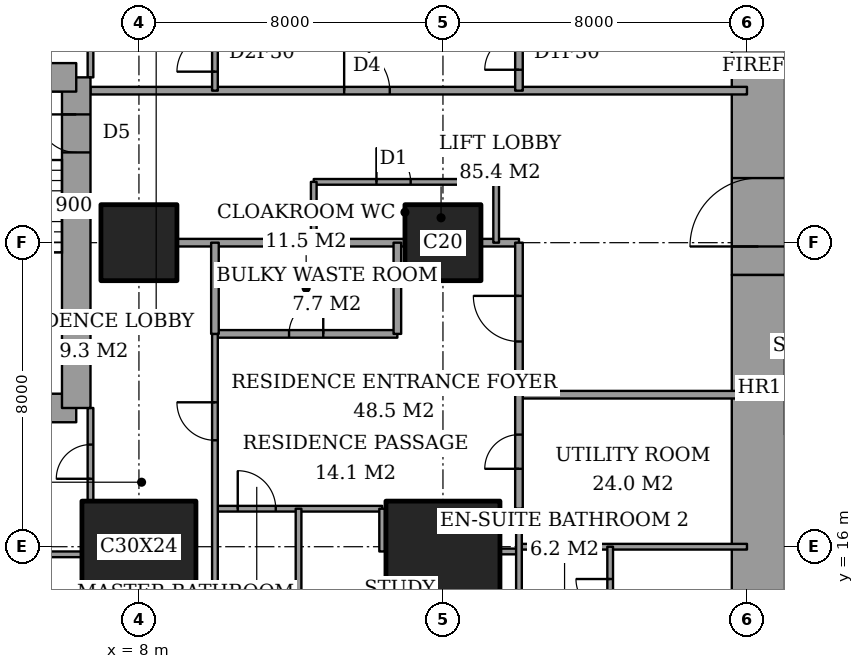
"""IFC4 building model, lengths in metres.
Left out: names, types, materials, properties, quantities, classifications, styles, units other than length and angle.
Written with IfcOpenShell. Run it as: python <this file> out.ifc"""

import sys

from ifc_helpers import new_model, si_unit, direction, frame, frame_2d, origin, origin_2d, place, context, subcontext, project, spatial, rectangle, extrude, element, fill, save


model = new_model("IFC4")
c1 = context("Model", 3, precision=1e-05, world=origin(), true_north=direction((0.0, 1.0)))
c2 = subcontext(c1, "Body", "Model", "MODEL_VIEW")
j1 = project(units=[si_unit("LENGTHUNIT", "METRE"), si_unit("PLANEANGLEUNIT", "RADIAN")], contexts=[c1])
p1 = place(None, origin())
s1 = spatial("IfcSite", under=j1, at=p1, CompositionType="ELEMENT")
p2 = place(p1, origin())
s2 = spatial("IfcBuilding", under=s1, at=p2, CompositionType="ELEMENT")
p3 = place(p2, frame((0.0, 0.0, 157.4)))
s3 = spatial("IfcBuildingStorey", under=s2, at=p3, CompositionType="ELEMENT", Elevation=157.4)
p4 = place(p3, frame((8.0, 16.0, 0.0), z_axis=(0.0, 0.0, 1.0), x_axis=(1.0, 0.0, 0.0)))
e1 = element("IfcColumn", 1, at=p4, inside=s3, PredefinedType="COLUMN", context=c2, shape_type="SweptSolid", body=[
    extrude(rectangle(XDim=3.0, YDim=2.4, at=origin_2d()), origin(), (0.0, 0.0, 1.0), 3.6),
])
p5 = place(p3, frame((8.0, 24.0, 0.0), z_axis=(0.0, 0.0, 1.0), x_axis=(1.0, 0.0, 0.0)))
e2 = element("IfcColumn", 2, at=p5, inside=s3, PredefinedType="COLUMN", context=c2, shape_type="SweptSolid", body=[
    extrude(rectangle(XDim=2.0, YDim=2.0, at=origin_2d()), origin(), (0.0, 0.0, 1.0), 3.6),
])
p6 = place(p3, frame((16.0, 16.0, 0.0), z_axis=(0.0, 0.0, 1.0), x_axis=(1.0, 0.0, 0.0)))
e3 = element("IfcColumn", 3, at=p6, inside=s3, PredefinedType="COLUMN", context=c2, shape_type="SweptSolid", body=[
    extrude(rectangle(XDim=3.0, YDim=2.4, at=origin_2d()), origin(), (0.0, 0.0, 1.0), 3.6),
])
p7 = place(p3, frame((16.0, 24.0, 0.0), z_axis=(0.0, 0.0, 1.0), x_axis=(1.0, 0.0, 0.0)))
e4 = element("IfcColumn", 4, at=p7, inside=s3, PredefinedType="COLUMN", context=c2, shape_type="SweptSolid", body=[
    extrude(rectangle(XDim=2.0, YDim=2.0, at=origin_2d()), origin(), (0.0, 0.0, 1.0), 3.6),
])
p8 = place(p3, frame((24.3, 13.0, 0.0), z_axis=(0.0, 0.0, 1.0), x_axis=(0.0, 1.0, 0.0)))
e5 = element("IfcWall", 5, at=p8, inside=s3, PredefinedType="SHEAR", context=c2, shape_type="SweptSolid", body=[
    extrude(rectangle(XDim=10.15, YDim=1.4, at=frame_2d((5.075, 0.0))), origin(), (0.0, 0.0, 1.0), 3.6),
])
p9 = place(p3, frame((24.3, 23.15, 0.0), z_axis=(0.0, 0.0, 1.0), x_axis=(0.0, 1.0, 0.0)))
e6 = element("IfcWall", 6, at=p9, inside=s3, PredefinedType="SHEAR", context=c2, shape_type="SweptSolid", body=[
    extrude(rectangle(XDim=11.85, YDim=1.4, at=frame_2d((5.925, 0.0))), origin(), (0.0, 0.0, 1.0), 3.6),
])
p10 = place(p9, frame((0.75, 0.0, 0.0)))
e7 = element("IfcOpeningElement", 7, at=p10, cuts=e6, PredefinedType="OPENING", context=c2, shape_type="SweptSolid", body=[
    extrude(rectangle(XDim=1.8, YDim=2.4, at=frame_2d((0.9, 1.2))), frame((0.0, 0.71, 0.0), z_axis=(0.0, -1.0, 0.0), x_axis=(1.0, 0.0, 0.0)), (0.0, 0.0, 1.0), 1.42),
])
p11 = place(p3, frame((1.9, 19.65, 0.0), z_axis=(0.0, 0.0, 1.0), x_axis=(1.0, 0.0, 0.0)))
e8 = element("IfcWall", 8, at=p11, inside=s3, PredefinedType="SHEAR", context=c2, shape_type="SweptSolid", body=[
    extrude(rectangle(XDim=4.45, YDim=0.75, at=frame_2d((2.225, 0.0))), origin(), (0.0, 0.0, 1.0), 3.6),
])
p12 = place(p3, frame((6.35, 19.65, 0.0), z_axis=(0.0, 0.0, 1.0), x_axis=(0.0, 1.0, 0.0)))
e9 = element("IfcWall", 9, at=p12, inside=s3, PredefinedType="SHEAR", context=c2, shape_type="SweptSolid", body=[
    extrude(rectangle(XDim=8.7, YDim=0.75, at=frame_2d((4.35, 0.0))), origin(), (0.0, 0.0, 1.0), 3.6),
])
p13 = place(p12, frame((6.725, 0.0, 0.0)))
e10 = element("IfcOpeningElement", 10, at=p13, cuts=e9, PredefinedType="OPENING", context=c2, shape_type="SweptSolid", body=[
    extrude(rectangle(XDim=1.0, YDim=2.1, at=frame_2d((0.5, 1.05))), frame((0.0, 0.385, 0.0), z_axis=(0.0, -1.0, 0.0), x_axis=(1.0, 0.0, 0.0)), (0.0, 0.0, 1.0), 0.77),
])
p14 = place(p3, frame((6.35, 28.35, 0.0), z_axis=(0.0, 0.0, 1.0), x_axis=(-1.0, 0.0, 0.0)))
e11 = element("IfcWall", 11, at=p14, inside=s3, PredefinedType="SHEAR", context=c2, shape_type="SweptSolid", body=[
    extrude(rectangle(XDim=4.45, YDim=0.75, at=frame_2d((2.225, 0.0))), origin(), (0.0, 0.0, 1.0), 3.6),
])
p15 = place(p3, frame((1.35, 15.8, 0.0), z_axis=(0.0, 0.0, 1.0), x_axis=(1.0, 0.0, 0.0)))
e12 = element("IfcWall", 12, at=p15, inside=s3, PredefinedType="PARTITIONING", context=c2, shape_type="SweptSolid", body=[
    extrude(rectangle(XDim=5.15, YDim=0.15, at=frame_2d((2.575, 0.0))), origin(), (0.0, 0.0, 1.0), 3.35),
])
p16 = place(p3, frame((17.5, 15.875, 0.0), z_axis=(0.0, 0.0, 1.0), x_axis=(1.0, 0.0, 0.0)))
e13 = element("IfcWall", 13, at=p16, inside=s3, PredefinedType="PARTITIONING", context=c2, shape_type="SweptSolid", body=[
    extrude(rectangle(XDim=0.5, YDim=0.15, at=frame_2d((0.25, 0.0))), origin(), (0.0, 0.0, 1.0), 2.634),
])
p17 = place(p3, frame((18.0, 16.0, 0.0), z_axis=(0.0, 0.0, 1.0), x_axis=(1.0, 0.0, 0.0)))
e14 = element("IfcWall", 14, at=p17, inside=s3, PredefinedType="PARTITIONING", context=c2, shape_type="SweptSolid", body=[
    extrude(rectangle(XDim=6.0, YDim=0.15, at=frame_2d((3.0, 0.0))), origin(), (0.0, 0.0, 1.0), 2.634),
])
p18 = place(p3, frame((10.0, 17.0, 0.0), z_axis=(0.0, 0.0, 1.0), x_axis=(1.0, 0.0, 0.0)))
e15 = element("IfcWall", 15, at=p18, inside=s3, PredefinedType="PARTITIONING", context=c2, shape_type="SweptSolid", body=[
    extrude(rectangle(XDim=4.4, YDim=0.15, at=frame_2d((2.2, 0.0))), origin(), (0.0, 0.0, 1.0), 3.35),
])
p19 = place(p18, frame((0.6, 0.0, 0.0)))
e16 = element("IfcOpeningElement", 16, at=p19, cuts=e15, PredefinedType="OPENING", context=c2, shape_type="SweptSolid", body=[
    extrude(rectangle(XDim=1.0, YDim=2.1, at=frame_2d((0.5, 1.05))), frame((0.0, 0.085, 0.0), z_axis=(0.0, -1.0, 0.0), x_axis=(1.0, 0.0, 0.0)), (0.0, 0.0, 1.0), 0.17),
])
p20 = place(p3, frame((18.0, 20.0, 0.0), z_axis=(0.0, 0.0, 1.0), x_axis=(1.0, 0.0, 0.0)))
e17 = element("IfcWall", 17, at=p20, inside=s3, PredefinedType="PARTITIONING", context=c2, shape_type="SweptSolid", body=[
    extrude(rectangle(XDim=6.0, YDim=0.2, at=frame_2d((3.0, 0.0))), origin(), (0.0, 0.0, 1.0), 3.35),
])
p21 = place(p3, frame((10.0, 21.6, 0.0), z_axis=(0.0, 0.0, 1.0), x_axis=(1.0, 0.0, 0.0)))
e18 = element("IfcWall", 18, at=p21, inside=s3, PredefinedType="PARTITIONING", context=c2, shape_type="SweptSolid", body=[
    extrude(rectangle(XDim=4.8, YDim=0.2, at=frame_2d((2.4, 0.0))), origin(), (0.0, 0.0, 1.0), 3.35),
])
p22 = place(p21, frame((1.95, 0.0, 0.0)))
e19 = element("IfcOpeningElement", 19, at=p22, cuts=e18, PredefinedType="OPENING", context=c2, shape_type="SweptSolid", body=[
    extrude(rectangle(XDim=0.9, YDim=2.1, at=frame_2d((0.45, 1.05))), frame((0.0, 0.11, 0.0), z_axis=(0.0, -1.0, 0.0), x_axis=(1.0, 0.0, 0.0)), (0.0, 0.0, 1.0), 0.22),
])
p23 = place(p3, frame((9.0, 24.0, 0.0), z_axis=(0.0, 0.0, 1.0), x_axis=(1.0, 0.0, 0.0)))
e20 = element("IfcWall", 20, at=p23, inside=s3, PredefinedType="PARTITIONING", context=c2, shape_type="SweptSolid", body=[
    extrude(rectangle(XDim=6.0, YDim=0.2, at=frame_2d((3.0, 0.0))), origin(), (0.0, 0.0, 1.0), 3.35),
])
p24 = place(p3, frame((17.0, 24.0, 0.0), z_axis=(0.0, 0.0, 1.0), x_axis=(1.0, 0.0, 0.0)))
e21 = element("IfcWall", 21, at=p24, inside=s3, PredefinedType="PARTITIONING", context=c2, shape_type="SweptSolid", body=[
    extrude(rectangle(XDim=1.0, YDim=0.2, at=frame_2d((0.5, 0.0))), origin(), (0.0, 0.0, 1.0), 3.35),
])
p25 = place(p3, frame((12.6, 25.6, 0.0), z_axis=(0.0, 0.0, 1.0), x_axis=(1.0, 0.0, 0.0)))
e22 = element("IfcWall", 22, at=p25, inside=s3, PredefinedType="PARTITIONING", context=c2, shape_type="SweptSolid", body=[
    extrude(rectangle(XDim=4.8, YDim=0.15, at=frame_2d((2.4, 0.0))), origin(), (0.0, 0.0, 1.0), 3.35),
])
p26 = place(p25, frame((1.65, 0.0, 0.0)))
e23 = element("IfcOpeningElement", 23, at=p26, cuts=e22, PredefinedType="OPENING", context=c2, shape_type="SweptSolid", body=[
    extrude(rectangle(XDim=0.9, YDim=2.1, at=frame_2d((0.45, 1.05))), frame((0.0, 0.085, 0.0), z_axis=(0.0, -1.0, 0.0), x_axis=(1.0, 0.0, 0.0)), (0.0, 0.0, 1.0), 0.17),
])
p27 = place(p3, frame((6.725, 28.0, 0.0), z_axis=(0.0, 0.0, 1.0), x_axis=(1.0, 0.0, 0.0)))
e24 = element("IfcWall", 24, at=p27, inside=s3, PredefinedType="PARTITIONING", context=c2, shape_type="SweptSolid", body=[
    extrude(rectangle(XDim=17.275, YDim=0.2, at=frame_2d((8.637, 0.0))), origin(), (0.0, 0.0, 1.0), 3.35),
])
p28 = place(p27, frame((6.675, 0.0, 0.0)))
e25 = element("IfcOpeningElement", 25, at=p28, cuts=e24, PredefinedType="OPENING", context=c2, shape_type="SweptSolid", body=[
    extrude(rectangle(XDim=1.2, YDim=2.4, at=frame_2d((0.6, 1.2))), frame((0.0, 0.11, 0.0), z_axis=(0.0, -1.0, 0.0), x_axis=(1.0, 0.0, 0.0)), (0.0, 0.0, 1.0), 0.22),
])
p29 = place(p3, frame((6.725, 17.2, 0.0), z_axis=(0.0, 0.0, 1.0), x_axis=(0.0, 1.0, 0.0)))
e26 = element("IfcWall", 26, at=p29, inside=s3, PredefinedType="PARTITIONING", context=c2, shape_type="SweptSolid", body=[
    extrude(rectangle(XDim=2.45, YDim=0.15, at=frame_2d((1.225, 0.0))), origin(), (0.0, 0.0, 1.0), 3.35),
])
p30 = place(p29, frame((0.587, 0.0, 0.0)))
e27 = element("IfcOpeningElement", 27, at=p30, cuts=e26, PredefinedType="OPENING", context=c2, shape_type="SweptSolid", body=[
    extrude(rectangle(XDim=0.9, YDim=2.1, at=frame_2d((0.45, 1.05))), frame((0.0, 0.085, 0.0), z_axis=(0.0, -1.0, 0.0), x_axis=(1.0, 0.0, 0.0)), (0.0, 0.0, 1.0), 0.17),
])
p31 = place(p3, frame((6.725, 28.35, 0.0), z_axis=(0.0, 0.0, 1.0), x_axis=(0.0, 1.0, 0.0)))
e28 = element("IfcWall", 28, at=p31, inside=s3, PredefinedType="PARTITIONING", context=c2, shape_type="SweptSolid", body=[
    extrude(rectangle(XDim=2.45, YDim=0.15, at=frame_2d((1.225, 0.0))), origin(), (0.0, 0.0, 1.0), 3.35),
])
p32 = place(p31, frame((0.913, 0.0, 0.0)))
e29 = element("IfcOpeningElement", 29, at=p32, cuts=e28, PredefinedType="OPENING", context=c2, shape_type="SweptSolid", body=[
    extrude(rectangle(XDim=1.0, YDim=2.1, at=frame_2d((0.5, 1.05))), frame((0.0, 0.085, 0.0), z_axis=(0.0, -1.0, 0.0), x_axis=(1.0, 0.0, 0.0)), (0.0, 0.0, 1.0), 0.17),
])
p33 = place(p3, frame((10.0, 21.6, 0.0), z_axis=(0.0, 0.0, 1.0), x_axis=(0.0, 1.0, 0.0)))
e30 = element("IfcWall", 30, at=p33, inside=s3, PredefinedType="PARTITIONING", context=c2, shape_type="SweptSolid", body=[
    extrude(rectangle(XDim=2.4, YDim=0.2, at=frame_2d((1.2, 0.0))), origin(), (0.0, 0.0, 1.0), 3.35),
])
p34 = place(p3, frame((10.0, 14.0, 0.0), z_axis=(0.0, 0.0, 1.0), x_axis=(0.0, 1.0, 0.0)))
e31 = element("IfcWall", 31, at=p34, inside=s3, PredefinedType="PARTITIONING", context=c2, shape_type="SweptSolid", body=[
    extrude(rectangle(XDim=7.6, YDim=0.15, at=frame_2d((3.8, 0.0))), origin(), (0.0, 0.0, 1.0), 3.35),
])
p35 = place(p34, frame((4.8, 0.0, 0.0)))
e32 = element("IfcOpeningElement", 32, at=p35, cuts=e31, PredefinedType="OPENING", context=c2, shape_type="SweptSolid", body=[
    extrude(rectangle(XDim=1.0, YDim=2.1, at=frame_2d((0.5, 1.05))), frame((0.0, 0.085, 0.0), z_axis=(0.0, -1.0, 0.0), x_axis=(1.0, 0.0, 0.0)), (0.0, 0.0, 1.0), 0.17),
])
p36 = place(p3, frame((10.0, 28.0, 0.0), z_axis=(0.0, 0.0, 1.0), x_axis=(0.0, 1.0, 0.0)))
e33 = element("IfcWall", 33, at=p36, inside=s3, PredefinedType="PARTITIONING", context=c2, shape_type="SweptSolid", body=[
    extrude(rectangle(XDim=9.4, YDim=0.15, at=frame_2d((4.7, 0.0))), origin(), (0.0, 0.0, 1.0), 3.35),
])
p37 = place(p36, frame((0.5, 0.0, 0.0)))
e34 = element("IfcOpeningElement", 34, at=p37, cuts=e33, PredefinedType="OPENING", context=c2, shape_type="SweptSolid", body=[
    extrude(rectangle(XDim=1.0, YDim=2.1, at=frame_2d((0.5, 1.05))), frame((0.0, 0.085, 0.0), z_axis=(0.0, -1.0, 0.0), x_axis=(1.0, 0.0, 0.0)), (0.0, 0.0, 1.0), 0.17),
])
p38 = place(p3, frame((12.2, 10.6, 0.0), z_axis=(0.0, 0.0, 1.0), x_axis=(0.0, 1.0, 0.0)))
e35 = element("IfcWall", 35, at=p38, inside=s3, PredefinedType="PARTITIONING", context=c2, shape_type="SweptSolid", body=[
    extrude(rectangle(XDim=6.4, YDim=0.15, at=frame_2d((3.2, 0.0))), origin(), (0.0, 0.0, 1.0), 3.35),
])
p39 = place(p3, frame((12.6, 24.0, 0.0), z_axis=(0.0, 0.0, 1.0), x_axis=(0.0, 1.0, 0.0)))
e36 = element("IfcWall", 36, at=p39, inside=s3, PredefinedType="PARTITIONING", context=c2, shape_type="SweptSolid", body=[
    extrude(rectangle(XDim=1.6, YDim=0.15, at=frame_2d((0.8, 0.0))), origin(), (0.0, 0.0, 1.0), 3.35),
])
p40 = place(p3, frame((14.4, 15.875, 0.0), z_axis=(0.0, 0.0, 1.0), x_axis=(0.0, 1.0, 0.0)))
e37 = element("IfcWall", 37, at=p40, inside=s3, PredefinedType="PARTITIONING", context=c2, shape_type="SweptSolid", body=[
    extrude(rectangle(XDim=1.125, YDim=0.15, at=frame_2d((0.562, 0.0))), origin(), (0.0, 0.0, 1.0), 3.35),
])
p41 = place(p3, frame((14.8, 21.6, 0.0), z_axis=(0.0, 0.0, 1.0), x_axis=(0.0, 1.0, 0.0)))
e38 = element("IfcWall", 38, at=p41, inside=s3, PredefinedType="PARTITIONING", context=c2, shape_type="SweptSolid", body=[
    extrude(rectangle(XDim=2.4, YDim=0.2, at=frame_2d((1.2, 0.0))), origin(), (0.0, 0.0, 1.0), 3.35),
])
p42 = place(p3, frame((17.4, 24.0, 0.0), z_axis=(0.0, 0.0, 1.0), x_axis=(0.0, 1.0, 0.0)))
e39 = element("IfcWall", 39, at=p42, inside=s3, PredefinedType="PARTITIONING", context=c2, shape_type="SweptSolid", body=[
    extrude(rectangle(XDim=1.6, YDim=0.15, at=frame_2d((0.8, 0.0))), origin(), (0.0, 0.0, 1.0), 3.35),
])
p43 = place(p3, frame((18.0, 17.0, 0.0), z_axis=(0.0, 0.0, 1.0), x_axis=(0.0, 1.0, 0.0)))
e40 = element("IfcWall", 40, at=p43, inside=s3, PredefinedType="PARTITIONING", context=c2, shape_type="SweptSolid", body=[
    extrude(rectangle(XDim=7.0, YDim=0.2, at=frame_2d((3.5, 0.0))), origin(), (0.0, 0.0, 1.0), 3.35),
])
p44 = place(p43, frame((4.4, 0.0, 0.0)))
e41 = element("IfcOpeningElement", 41, at=p44, cuts=e40, PredefinedType="OPENING", context=c2, shape_type="SweptSolid", body=[
    extrude(rectangle(XDim=1.2, YDim=2.4, at=frame_2d((0.6, 1.2))), frame((0.0, 0.11, 0.0), z_axis=(0.0, -1.0, 0.0), x_axis=(1.0, 0.0, 0.0)), (0.0, 0.0, 1.0), 0.22),
])
p45 = place(p43, frame((1.05, 0.0, 0.0)))
e42 = element("IfcOpeningElement", 42, at=p45, cuts=e40, PredefinedType="OPENING", context=c2, shape_type="SweptSolid", body=[
    extrude(rectangle(XDim=0.9, YDim=2.1, at=frame_2d((0.45, 1.05))), frame((0.0, 0.11, 0.0), z_axis=(0.0, -1.0, 0.0), x_axis=(1.0, 0.0, 0.0)), (0.0, 0.0, 1.0), 0.22),
])
p46 = place(p3, frame((18.0, 28.0, 0.0), z_axis=(0.0, 0.0, 1.0), x_axis=(0.0, 1.0, 0.0)))
e43 = element("IfcWall", 43, at=p46, inside=s3, PredefinedType="PARTITIONING", context=c2, shape_type="SweptSolid", body=[
    extrude(rectangle(XDim=4.0, YDim=0.2, at=frame_2d((2.0, 0.0))), origin(), (0.0, 0.0, 1.0), 3.35),
])
p47 = place(p46, frame((0.55, 0.0, 0.0)))
e44 = element("IfcOpeningElement", 44, at=p47, cuts=e43, PredefinedType="OPENING", context=c2, shape_type="SweptSolid", body=[
    extrude(rectangle(XDim=0.9, YDim=2.1, at=frame_2d((0.45, 1.05))), frame((0.0, 0.11, 0.0), z_axis=(0.0, -1.0, 0.0), x_axis=(1.0, 0.0, 0.0)), (0.0, 0.0, 1.0), 0.22),
])
p48 = place(p3, frame((18.0, 10.6, 0.0), z_axis=(0.0, 0.0, 1.0), x_axis=(0.0, 1.0, 0.0)))
e45 = element("IfcWall", 45, at=p48, inside=s3, PredefinedType="PARTITIONING", context=c2, shape_type="SweptSolid", body=[
    extrude(rectangle(XDim=6.4, YDim=0.15, at=frame_2d((3.2, 0.0))), origin(), (0.0, 0.0, 1.0), 3.35),
])
p49 = place(p3, frame((20.4, 13.4, 0.0), z_axis=(0.0, 0.0, 1.0), x_axis=(0.0, 1.0, 0.0)))
e46 = element("IfcWall", 46, at=p49, inside=s3, PredefinedType="PARTITIONING", context=c2, shape_type="SweptSolid", body=[
    extrude(rectangle(XDim=2.6, YDim=0.15, at=frame_2d((1.3, 0.0))), origin(), (0.0, 0.0, 1.0), 3.35),
])
p50 = place(p49, frame((0.85, 0.0, 0.0)))
e47 = element("IfcOpeningElement", 47, at=p50, cuts=e46, PredefinedType="OPENING", context=c2, shape_type="SweptSolid", body=[
    extrude(rectangle(XDim=0.9, YDim=2.1, at=frame_2d((0.45, 1.05))), frame((0.0, 0.085, 0.0), z_axis=(0.0, -1.0, 0.0), x_axis=(1.0, 0.0, 0.0)), (0.0, 0.0, 1.0), 0.17),
])
p51 = place(p30, origin())
e48 = element("IfcDoor", 48, at=p51, inside=s3, OperationType="SINGLE_SWING_RIGHT", PredefinedType="DOOR", context=c2, shape_type="SweptSolid", body=[
    extrude(rectangle(XDim=0.9, YDim=2.1, at=frame_2d((0.45, 1.05))), frame((0.0, 0.025, 0.0), z_axis=(0.0, -1.0, 0.0), x_axis=(1.0, 0.0, 0.0)), (0.0, 0.0, 1.0), 0.05),
])
fill(e27, e48)
p52 = place(p35, origin())
e49 = element("IfcDoor", 49, at=p52, inside=s3, OperationType="SINGLE_SWING_LEFT", PredefinedType="DOOR", context=c2, shape_type="SweptSolid", body=[
    extrude(rectangle(XDim=1.0, YDim=2.1, at=frame_2d((0.5, 1.05))), frame((0.0, 0.025, 0.0), z_axis=(0.0, -1.0, 0.0), x_axis=(1.0, 0.0, 0.0)), (0.0, 0.0, 1.0), 0.05),
])
fill(e32, e49)
p53 = place(p22, origin())
e50 = element("IfcDoor", 50, at=p53, inside=s3, OperationType="SINGLE_SWING_LEFT", PredefinedType="DOOR", context=c2, shape_type="SweptSolid", body=[
    extrude(rectangle(XDim=0.9, YDim=2.1, at=frame_2d((0.45, 1.05))), frame((0.0, 0.025, 0.0), z_axis=(0.0, -1.0, 0.0), x_axis=(1.0, 0.0, 0.0)), (0.0, 0.0, 1.0), 0.05),
])
fill(e19, e50)
p54 = place(p44, origin())
e51 = element("IfcDoor", 51, at=p54, inside=s3, OperationType="SINGLE_SWING_LEFT", PredefinedType="DOOR", context=c2, shape_type="SweptSolid", body=[
    extrude(rectangle(XDim=1.2, YDim=2.4, at=frame_2d((0.6, 1.2))), frame((0.0, 0.025, 0.0), z_axis=(0.0, -1.0, 0.0), x_axis=(1.0, 0.0, 0.0)), (0.0, 0.0, 1.0), 0.05),
])
fill(e41, e51)
p55 = place(p19, origin())
e52 = element("IfcDoor", 52, at=p55, inside=s3, OperationType="SINGLE_SWING_RIGHT", PredefinedType="DOOR", context=c2, shape_type="SweptSolid", body=[
    extrude(rectangle(XDim=1.0, YDim=2.1, at=frame_2d((0.5, 1.05))), frame((0.0, 0.025, 0.0), z_axis=(0.0, -1.0, 0.0), x_axis=(1.0, 0.0, 0.0)), (0.0, 0.0, 1.0), 0.05),
])
fill(e16, e52)
p56 = place(p50, origin())
e53 = element("IfcDoor", 53, at=p56, inside=s3, OperationType="SINGLE_SWING_LEFT", PredefinedType="DOOR", context=c2, shape_type="SweptSolid", body=[
    extrude(rectangle(XDim=0.9, YDim=2.1, at=frame_2d((0.45, 1.05))), frame((0.0, 0.025, 0.0), z_axis=(0.0, -1.0, 0.0), x_axis=(1.0, 0.0, 0.0)), (0.0, 0.0, 1.0), 0.05),
])
fill(e47, e53)
p57 = place(p45, origin())
e54 = element("IfcDoor", 54, at=p57, inside=s3, OperationType="SINGLE_SWING_RIGHT", PredefinedType="DOOR", context=c2, shape_type="SweptSolid", body=[
    extrude(rectangle(XDim=0.9, YDim=2.1, at=frame_2d((0.45, 1.05))), frame((0.0, 0.025, 0.0), z_axis=(0.0, -1.0, 0.0), x_axis=(1.0, 0.0, 0.0)), (0.0, 0.0, 1.0), 0.05),
])
fill(e42, e54)
p58 = place(p37, origin())
e55 = element("IfcDoor", 55, at=p58, inside=s3, OperationType="SINGLE_SWING_RIGHT", PredefinedType="DOOR", context=c2, shape_type="SweptSolid", body=[
    extrude(rectangle(XDim=1.0, YDim=2.1, at=frame_2d((0.5, 1.05))), frame((0.0, 0.025, 0.0), z_axis=(0.0, -1.0, 0.0), x_axis=(1.0, 0.0, 0.0)), (0.0, 0.0, 1.0), 0.05),
])
fill(e34, e55)
p59 = place(p28, origin())
e56 = element("IfcDoor", 56, at=p59, inside=s3, OperationType="SINGLE_SWING_RIGHT", PredefinedType="DOOR", context=c2, shape_type="SweptSolid", body=[
    extrude(rectangle(XDim=1.2, YDim=2.4, at=frame_2d((0.6, 1.2))), frame((0.0, 0.025, 0.0), z_axis=(0.0, -1.0, 0.0), x_axis=(1.0, 0.0, 0.0)), (0.0, 0.0, 1.0), 0.05),
])
fill(e25, e56)
p60 = place(p47, origin())
e57 = element("IfcDoor", 57, at=p60, inside=s3, OperationType="SINGLE_SWING_RIGHT", PredefinedType="DOOR", context=c2, shape_type="SweptSolid", body=[
    extrude(rectangle(XDim=0.9, YDim=2.1, at=frame_2d((0.45, 1.05))), frame((0.0, 0.025, 0.0), z_axis=(0.0, -1.0, 0.0), x_axis=(1.0, 0.0, 0.0)), (0.0, 0.0, 1.0), 0.05),
])
fill(e44, e57)
p61 = place(p26, origin())
e58 = element("IfcDoor", 58, at=p61, inside=s3, OperationType="SINGLE_SWING_RIGHT", PredefinedType="DOOR", context=c2, shape_type="SweptSolid", body=[
    extrude(rectangle(XDim=0.9, YDim=2.1, at=frame_2d((0.45, 1.05))), frame((0.0, 0.025, 0.0), z_axis=(0.0, -1.0, 0.0), x_axis=(1.0, 0.0, 0.0)), (0.0, 0.0, 1.0), 0.05),
])
fill(e23, e58)
p62 = place(p10, origin())
e59 = element("IfcDoor", 59, at=p62, inside=s3, OperationType="DOUBLE_DOOR_DOUBLE_SWING", PredefinedType="DOOR", context=c2, shape_type="SweptSolid", body=[
    extrude(rectangle(XDim=1.8, YDim=2.4, at=frame_2d((0.9, 1.2))), frame((0.0, 0.025, 0.0), z_axis=(0.0, -1.0, 0.0), x_axis=(1.0, 0.0, 0.0)), (0.0, 0.0, 1.0), 0.05),
])
fill(e7, e59)
p63 = place(p13, origin())
e60 = element("IfcDoor", 60, at=p63, inside=s3, OperationType="SINGLE_SWING_LEFT", PredefinedType="DOOR", context=c2, shape_type="SweptSolid", body=[
    extrude(rectangle(XDim=1.0, YDim=2.1, at=frame_2d((0.5, 1.05))), frame((0.0, 0.025, 0.0), z_axis=(0.0, -1.0, 0.0), x_axis=(1.0, 0.0, 0.0)), (0.0, 0.0, 1.0), 0.05),
])
fill(e10, e60)
save(model, sys.argv[1])
